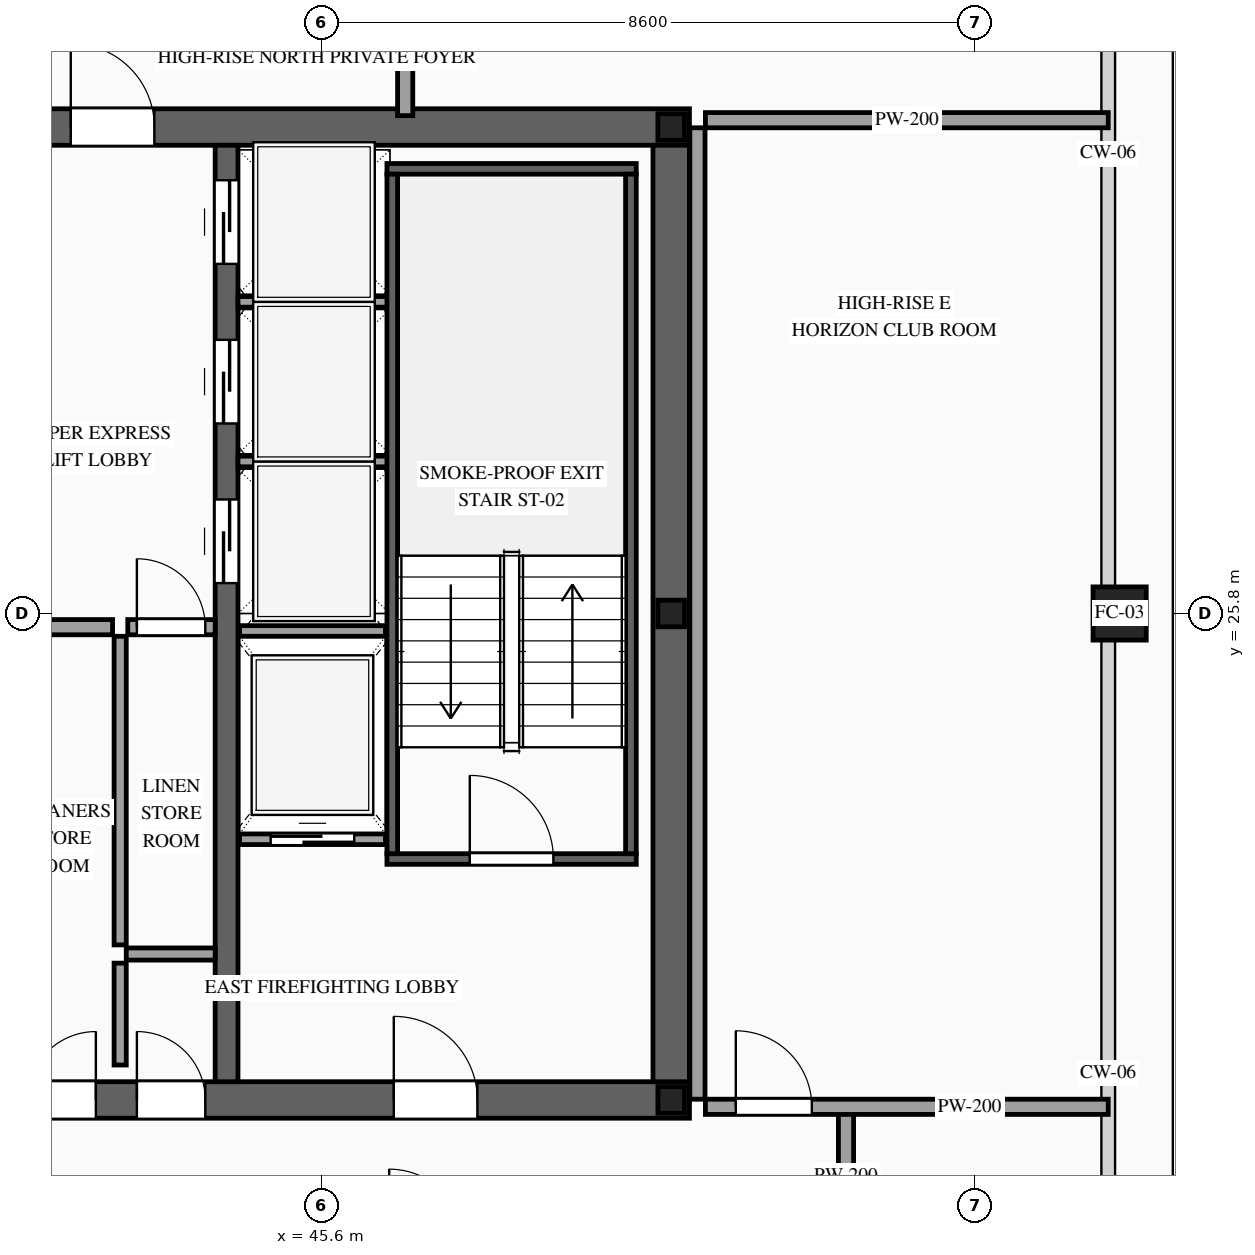
"""IFC4 building model, lengths in metres.
Left out: names, types, materials, properties, quantities, classifications, styles, units other than length and angle.
Written with IfcOpenShell. Run it as: python <this file> out.ifc"""

import sys

from ifc_helpers import new_model, si_unit, direction, frame, frame_2d, origin, origin_2d, place, context, subcontext, project, spatial, rectangle, hollow_rectangle, i_section, extrude, source, transform, mapped, element, fill, save


model = new_model("IFC4")
c1 = context("Model", 3, precision=1e-05, world=origin(), true_north=direction((0.0, 1.0)))
c2 = subcontext(c1, "Body", "Model", "MODEL_VIEW")
j1 = project(units=[si_unit("LENGTHUNIT", "METRE"), si_unit("PLANEANGLEUNIT", "RADIAN")], contexts=[c1])
p1 = place(None, origin())
s1 = spatial("IfcSite", under=j1, at=p1, CompositionType="ELEMENT")
p2 = place(p1, origin())
s2 = spatial("IfcBuilding", under=s1, at=p2, CompositionType="ELEMENT")
p3 = place(p2, frame((0.0, 0.0, 314.7)))
s3 = spatial("IfcBuildingStorey", under=s2, at=p3, CompositionType="ELEMENT", Elevation=314.7)
p4 = place(p3, frame((23.56, 19.4, 0.0), z_axis=(0.0, 0.0, 1.0), x_axis=(1.0, 0.0, 0.0)))
e1 = element("IfcWall", 1, at=p4, inside=s3, PredefinedType="SHEAR", context=c2, shape_type="SweptSolid", body=[
    extrude(rectangle(XDim=26.88, YDim=0.48, at=frame_2d((13.44, 0.0))), origin(), (0.0, 0.0, 1.0), 3.5),
])
p5 = place(p4, frame((1.89, 0.0, 0.0)))
e2 = element("IfcOpeningElement", 2, at=p5, cuts=e1, PredefinedType="OPENING", context=c2, shape_type="SweptSolid", body=[
    extrude(rectangle(XDim=1.1, YDim=2.2, at=frame_2d((0.55, 1.1))), frame((0.0, 0.255, 0.0), z_axis=(0.0, -1.0, 0.0), x_axis=(1.0, 0.0, 0.0)), (0.0, 0.0, 1.0), 0.51),
])
p6 = place(p4, frame((9.79, 0.0, 0.0)))
e3 = element("IfcOpeningElement", 3, at=p6, cuts=e1, PredefinedType="OPENING", context=c2, shape_type="SweptSolid", body=[
    extrude(rectangle(XDim=1.1, YDim=2.2, at=frame_2d((0.55, 1.1))), frame((0.0, 0.255, 0.0), z_axis=(0.0, -1.0, 0.0), x_axis=(1.0, 0.0, 0.0)), (0.0, 0.0, 1.0), 0.51),
])
p7 = place(p4, frame((22.99, 0.0, 0.0)))
e4 = element("IfcOpeningElement", 4, at=p7, cuts=e1, PredefinedType="OPENING", context=c2, shape_type="SweptSolid", body=[
    extrude(rectangle(XDim=1.1, YDim=2.2, at=frame_2d((0.55, 1.1))), frame((0.0, 0.255, 0.0), z_axis=(0.0, -1.0, 0.0), x_axis=(1.0, 0.0, 0.0)), (0.0, 0.0, 1.0), 0.51),
])
p8 = place(p4, frame((19.61, 0.0, 0.0)))
e5 = element("IfcOpeningElement", 5, at=p8, cuts=e1, PredefinedType="OPENING", context=c2, shape_type="SweptSolid", body=[
    extrude(rectangle(XDim=0.9, YDim=2.15, at=frame_2d((0.45, 1.075))), frame((0.0, 0.255, 0.0), z_axis=(0.0, -1.0, 0.0), x_axis=(1.0, 0.0, 0.0)), (0.0, 0.0, 1.0), 0.51),
])
p9 = place(p4, frame((18.17, 0.0, 0.0)))
e6 = element("IfcOpeningElement", 6, at=p9, cuts=e1, PredefinedType="OPENING", context=c2, shape_type="SweptSolid", body=[
    extrude(rectangle(XDim=0.9, YDim=2.15, at=frame_2d((0.45, 1.075))), frame((0.0, 0.255, 0.0), z_axis=(0.0, -1.0, 0.0), x_axis=(1.0, 0.0, 0.0)), (0.0, 0.0, 1.0), 0.51),
])
p10 = place(p3, frame((23.56, 32.2, 0.0), z_axis=(0.0, 0.0, 1.0), x_axis=(1.0, 0.0, 0.0)))
e7 = element("IfcWall", 7, at=p10, inside=s3, PredefinedType="SHEAR", context=c2, shape_type="SweptSolid", body=[
    extrude(rectangle(XDim=26.88, YDim=0.48, at=frame_2d((13.44, 0.0))), origin(), (0.0, 0.0, 1.0), 3.5),
])
p11 = place(p10, frame((4.51, 0.0, 0.0)))
e8 = element("IfcOpeningElement", 8, at=p11, cuts=e7, PredefinedType="OPENING", context=c2, shape_type="SweptSolid", body=[
    extrude(rectangle(XDim=0.9, YDim=2.15, at=frame_2d((0.45, 1.075))), frame((0.0, 0.255, 0.0), z_axis=(0.0, -1.0, 0.0), x_axis=(1.0, 0.0, 0.0)), (0.0, 0.0, 1.0), 0.51),
])
p12 = place(p10, frame((9.79, 0.0, 0.0)))
e9 = element("IfcOpeningElement", 9, at=p12, cuts=e7, PredefinedType="OPENING", context=c2, shape_type="SweptSolid", body=[
    extrude(rectangle(XDim=1.1, YDim=2.2, at=frame_2d((0.55, 1.1))), frame((0.0, 0.255, 0.0), z_axis=(0.0, -1.0, 0.0), x_axis=(1.0, 0.0, 0.0)), (0.0, 0.0, 1.0), 0.51),
])
p13 = place(p10, frame((15.64, 0.0, 0.0)))
e10 = element("IfcOpeningElement", 10, at=p13, cuts=e7, PredefinedType="OPENING", context=c2, shape_type="SweptSolid", body=[
    extrude(rectangle(XDim=1.1, YDim=2.2, at=frame_2d((0.55, 1.1))), frame((0.0, 0.255, 0.0), z_axis=(0.0, -1.0, 0.0), x_axis=(1.0, 0.0, 0.0)), (0.0, 0.0, 1.0), 0.51),
])
p14 = place(p10, frame((18.74, 0.0, 0.0)))
e11 = element("IfcOpeningElement", 11, at=p14, cuts=e7, PredefinedType="OPENING", context=c2, shape_type="SweptSolid", body=[
    extrude(rectangle(XDim=1.1, YDim=2.2, at=frame_2d((0.55, 1.1))), frame((0.0, 0.255, 0.0), z_axis=(0.0, -1.0, 0.0), x_axis=(1.0, 0.0, 0.0)), (0.0, 0.0, 1.0), 0.51),
])
m1 = source(origin(), c2, "Body", "SweptSolid", [
    extrude(rectangle(XDim=12.32, YDim=0.48, at=frame_2d((6.16, 0.0))), origin(), (0.0, 0.0, 1.0), 3.5),
])
p15 = place(p3, frame((50.2, 19.64, 0.0), z_axis=(0.0, 0.0, 1.0), x_axis=(0.0, 1.0, 0.0)))
e12 = element("IfcWall", 12, at=p15, inside=s3, PredefinedType="SHEAR", context=c2, shape_type="MappedRepresentation", body=[
    mapped(m1, transform((0.0, 0.0, 0.0), scale=1.0)),
])
p16 = place(p3, frame((44.35, 19.64, 0.0), z_axis=(0.0, 0.0, 1.0), x_axis=(0.0, 1.0, 0.0)))
e13 = element("IfcWall", 13, at=p16, inside=s3, PredefinedType="SOLIDWALL", context=c2, shape_type="SweptSolid", body=[
    extrude(rectangle(XDim=12.32, YDim=0.3, at=frame_2d((6.16, 0.0))), origin(), (0.0, 0.0, 1.0), 3.5),
])
p17 = place(p16, frame((6.56, 0.0, 0.0)))
e14 = element("IfcOpeningElement", 14, at=p17, cuts=e13, PredefinedType="OPENING", context=c2, shape_type="SweptSolid", body=[
    extrude(rectangle(XDim=1.1, YDim=2.2, at=frame_2d((0.55, 1.1))), frame((0.0, 0.165, 0.0), z_axis=(0.0, -1.0, 0.0), x_axis=(1.0, 0.0, 0.0)), (0.0, 0.0, 1.0), 0.33),
])
p18 = place(p16, frame((8.66, 0.0, 0.0)))
e15 = element("IfcOpeningElement", 15, at=p18, cuts=e13, PredefinedType="OPENING", context=c2, shape_type="SweptSolid", body=[
    extrude(rectangle(XDim=1.1, YDim=2.2, at=frame_2d((0.55, 1.1))), frame((0.0, 0.165, 0.0), z_axis=(0.0, -1.0, 0.0), x_axis=(1.0, 0.0, 0.0)), (0.0, 0.0, 1.0), 0.33),
])
p19 = place(p16, frame((10.76, 0.0, 0.0)))
e16 = element("IfcOpeningElement", 16, at=p19, cuts=e13, PredefinedType="OPENING", context=c2, shape_type="SweptSolid", body=[
    extrude(rectangle(XDim=1.1, YDim=2.2, at=frame_2d((0.55, 1.1))), frame((0.0, 0.165, 0.0), z_axis=(0.0, -1.0, 0.0), x_axis=(1.0, 0.0, 0.0)), (0.0, 0.0, 1.0), 0.33),
])
m2 = source(origin(), c2, "Body", "SweptSolid", [
    extrude(i_section(OverallWidth=0.35, OverallDepth=0.35, WebThickness=0.012, FlangeThickness=0.019, at=origin_2d()), origin(), (0.0, 0.0, 1.0), 3.5),
])
for number, where, z_axis, x_axis in (
    (17, (50.2, 19.4, 0.0), (0.0, 0.0, 1.0), (1.0, 0.0, 0.0)),
    (18, (50.2, 25.8, 0.0), (0.0, 0.0, 1.0), (1.0, 0.0, 0.0)),
    (19, (50.2, 32.2, 0.0), (0.0, 0.0, 1.0), (1.0, 0.0, 0.0)),
):
    element("IfcColumn", number, at=place(p3, frame(where, z_axis=z_axis, x_axis=x_axis)), inside=s3, PredefinedType="COLUMN", context=c2, shape_type="MappedRepresentation", body=[
        mapped(m2, transform((0.0, 0.0, 0.0), scale=1.0)),
    ])
m3 = source(origin(), c2, "Body", "SweptSolid", [
    extrude(hollow_rectangle(XDim=0.7, YDim=0.7, WallThickness=0.032, at=origin_2d()), origin(), (0.0, 0.0, 1.0), 3.5),
])
p20 = place(p3, frame((56.1, 25.8, 0.0), z_axis=(0.0, 0.0, 1.0), x_axis=(1.0, 0.0, 0.0)))
e20 = element("IfcColumn", 20, at=p20, inside=s3, PredefinedType="COLUMN", context=c2, shape_type="MappedRepresentation", body=[
    mapped(m3, transform((0.0, 0.0, 0.0), scale=1.0)),
])
p21 = place(p3, frame((44.52, 22.83, 0.0), z_axis=(0.0, 0.0, 1.0), x_axis=(1.0, 0.0, 0.0)))
e21 = element("IfcWall", 21, at=p21, inside=s3, PredefinedType="SOLIDWALL", context=c2, shape_type="SweptSolid", body=[
    extrude(rectangle(XDim=1.92, YDim=0.14, at=frame_2d((0.96, 0.0))), origin(), (0.0, 0.0, 1.0), 3.28),
])
p22 = place(p21, frame((0.41, 0.0, 0.0)))
e22 = element("IfcOpeningElement", 22, at=p22, cuts=e21, PredefinedType="OPENING", context=c2, shape_type="SweptSolid", body=[
    extrude(rectangle(XDim=1.1, YDim=2.2, at=frame_2d((0.55, 1.1))), frame((0.0, 0.085, 0.0), z_axis=(0.0, -1.0, 0.0), x_axis=(1.0, 0.0, 0.0)), (0.0, 0.0, 1.0), 0.17),
])
m4 = source(origin(), c2, "Body", "SweptSolid", [
    extrude(rectangle(XDim=1.92, YDim=0.14, at=frame_2d((0.96, 0.0))), origin(), (0.0, 0.0, 1.0), 3.28),
])
p23 = place(p3, frame((44.52, 25.57, 0.0), z_axis=(0.0, 0.0, 1.0), x_axis=(1.0, 0.0, 0.0)))
e23 = element("IfcWall", 23, at=p23, inside=s3, PredefinedType="SOLIDWALL", context=c2, shape_type="MappedRepresentation", body=[
    mapped(m4, transform((0.0, 0.0, 0.0), scale=1.0)),
])
m5 = source(origin(), c2, "Body", "SweptSolid", [
    extrude(rectangle(XDim=2.0, YDim=0.14, at=frame_2d((1.0, 0.0))), origin(), (0.0, 0.0, 1.0), 3.28),
])
for number, where, z_axis, x_axis in (
    (24, (44.5, 27.8, 0.0), (0.0, 0.0, 1.0), (1.0, 0.0, 0.0)),
    (25, (44.5, 29.9, 0.0), (0.0, 0.0, 1.0), (1.0, 0.0, 0.0)),
):
    element("IfcWall", number, at=place(p3, frame(where, z_axis=z_axis, x_axis=x_axis)), inside=s3, PredefinedType="SOLIDWALL", context=c2, shape_type="MappedRepresentation", body=[
        mapped(m5, transform((0.0, 0.0, 0.0), scale=1.0)),
    ])
p24 = place(p3, frame((46.46, 22.57, 0.0), z_axis=(0.0, 0.0, 1.0), x_axis=(1.0, 0.0, 0.0)))
e26 = element("IfcWall", 26, at=p24, inside=s3, PredefinedType="SOLIDWALL", context=c2, shape_type="SweptSolid", body=[
    extrude(rectangle(XDim=3.28, YDim=0.14, at=frame_2d((1.64, 0.0))), origin(), (0.0, 0.0, 1.0), 3.28),
])
p25 = place(p24, frame((1.09, 0.0, 0.0)))
e27 = element("IfcOpeningElement", 27, at=p25, cuts=e26, PredefinedType="OPENING", context=c2, shape_type="SweptSolid", body=[
    extrude(rectangle(XDim=1.1, YDim=2.2, at=frame_2d((0.55, 1.1))), frame((0.0, 0.085, 0.0), z_axis=(0.0, -1.0, 0.0), x_axis=(1.0, 0.0, 0.0)), (0.0, 0.0, 1.0), 0.17),
])
m6 = source(origin(), c2, "Body", "SweptSolid", [
    extrude(rectangle(XDim=3.28, YDim=0.14, at=frame_2d((1.64, 0.0))), origin(), (0.0, 0.0, 1.0), 3.28),
])
p26 = place(p3, frame((46.46, 31.65, 0.0), z_axis=(0.0, 0.0, 1.0), x_axis=(1.0, 0.0, 0.0)))
e28 = element("IfcWall", 28, at=p26, inside=s3, PredefinedType="SOLIDWALL", context=c2, shape_type="MappedRepresentation", body=[
    mapped(m6, transform((0.0, 0.0, 0.0), scale=1.0)),
])
m7 = source(origin(), c2, "Body", "SweptSolid", [
    extrude(rectangle(XDim=8.94, YDim=0.14, at=frame_2d((4.47, 0.0))), origin(), (0.0, 0.0, 1.0), 3.28),
])
for number, where, z_axis, x_axis in (
    (29, (46.53, 22.64, 0.0), (0.0, 0.0, 1.0), (0.0, 1.0, 0.0)),
    (30, (49.67, 22.64, 0.0), (0.0, 0.0, 1.0), (0.0, 1.0, 0.0)),
):
    element("IfcWall", number, at=place(p3, frame(where, z_axis=z_axis, x_axis=x_axis)), inside=s3, PredefinedType="SOLIDWALL", context=c2, shape_type="MappedRepresentation", body=[
        mapped(m7, transform((0.0, 0.0, 0.0), scale=1.0)),
    ])
m8 = source(origin(), c2, "Body", "SweptSolid", [
    extrude(rectangle(XDim=1.34, YDim=0.16, at=frame_2d((0.67, 0.0))), origin(), (0.0, 0.0, 1.0), 3.28),
])
p27 = place(p3, frame((42.95, 19.86, 0.0), z_axis=(0.0, 0.0, 1.0), x_axis=(0.0, 1.0, 0.0)))
e31 = element("IfcWall", 31, at=p27, inside=s3, PredefinedType="PARTITIONING", context=c2, shape_type="MappedRepresentation", body=[
    mapped(m8, transform((0.0, 0.0, 0.0), scale=1.0)),
])
m9 = source(origin(), c2, "Body", "SweptSolid", [
    extrude(rectangle(XDim=1.17, YDim=0.16, at=frame_2d((0.585, 0.0))), origin(), (0.0, 0.0, 1.0), 3.28),
])
p28 = place(p3, frame((43.03, 21.32, 0.0), z_axis=(0.0, 0.0, 1.0), x_axis=(1.0, 0.0, 0.0)))
e32 = element("IfcWall", 32, at=p28, inside=s3, PredefinedType="PARTITIONING", context=c2, shape_type="MappedRepresentation", body=[
    mapped(m9, transform((0.0, 0.0, 0.0), scale=1.0)),
])
m10 = source(origin(), c2, "Body", "SweptSolid", [
    extrude(rectangle(XDim=1.35, YDim=0.2, at=frame_2d((0.675, 0.0))), origin(), (0.0, 0.0, 1.0), 3.28),
])
p29 = place(p3, frame((41.5, 25.62, 0.0), z_axis=(0.0, 0.0, 1.0), x_axis=(1.0, 0.0, 0.0)))
e33 = element("IfcWall", 33, at=p29, inside=s3, PredefinedType="PARTITIONING", context=c2, shape_type="MappedRepresentation", body=[
    mapped(m10, transform((0.0, 0.0, 0.0), scale=1.0)),
])
m11 = source(origin(), c2, "Body", "SweptSolid", [
    extrude(rectangle(XDim=4.06, YDim=0.16, at=frame_2d((2.03, 0.0))), origin(), (0.0, 0.0, 1.0), 3.28),
])
p30 = place(p3, frame((42.95, 21.44, 0.0), z_axis=(0.0, 0.0, 1.0), x_axis=(0.0, 1.0, 0.0)))
e34 = element("IfcWall", 34, at=p30, inside=s3, PredefinedType="PARTITIONING", context=c2, shape_type="MappedRepresentation", body=[
    mapped(m11, transform((0.0, 0.0, 0.0), scale=1.0)),
])
p31 = place(p3, frame((43.05, 25.62, 0.0), z_axis=(0.0, 0.0, 1.0), x_axis=(1.0, 0.0, 0.0)))
e35 = element("IfcWall", 35, at=p31, inside=s3, PredefinedType="PARTITIONING", context=c2, shape_type="SweptSolid", body=[
    extrude(rectangle(XDim=1.15, YDim=0.2, at=frame_2d((0.575, 0.0))), origin(), (0.0, 0.0, 1.0), 3.28),
])
p32 = place(p31, frame((0.12, 0.0, 0.0)))
e36 = element("IfcOpeningElement", 36, at=p32, cuts=e35, PredefinedType="OPENING", context=c2, shape_type="SweptSolid", body=[
    extrude(rectangle(XDim=0.9, YDim=2.15, at=frame_2d((0.45, 1.075))), frame((0.0, 0.115, 0.0), z_axis=(0.0, -1.0, 0.0), x_axis=(1.0, 0.0, 0.0)), (0.0, 0.0, 1.0), 0.23),
])
m12 = source(origin(), c2, "Body", "SweptSolid", [
    extrude(rectangle(XDim=1.7, YDim=0.2, at=frame_2d((0.85, 0.0))), origin(), (0.0, 0.0, 1.0), 3.28),
])
for number, where, z_axis, x_axis in (
    (37, (46.7, 32.35, 0.0), (0.0, 0.0, 1.0), (0.0, 1.0, 0.0)),
    (38, (52.5, 17.55, 0.0), (0.0, 0.0, 1.0), (0.0, 1.0, 0.0)),
):
    element("IfcWall", number, at=place(p3, frame(where, z_axis=z_axis, x_axis=x_axis)), inside=s3, PredefinedType="PARTITIONING", context=c2, shape_type="MappedRepresentation", body=[
        mapped(m12, transform((0.0, 0.0, 0.0), scale=1.0)),
    ])
p33 = place(p3, frame((50.65, 19.31, 0.0), z_axis=(0.0, 0.0, 1.0), x_axis=(1.0, 0.0, 0.0)))
e39 = element("IfcWall", 39, at=p33, inside=s3, PredefinedType="PARTITIONING", context=c2, shape_type="SweptSolid", body=[
    extrude(rectangle(XDim=5.3, YDim=0.2, at=frame_2d((2.65, 0.0))), origin(), (0.0, 0.0, 1.0), 2.825),
])
p34 = place(p33, frame((0.4, 0.0, 0.0)))
e40 = element("IfcOpeningElement", 40, at=p34, cuts=e39, PredefinedType="OPENING", context=c2, shape_type="SweptSolid", body=[
    extrude(rectangle(XDim=1.0, YDim=2.2, at=frame_2d((0.5, 1.1))), frame((0.0, 0.115, 0.0), z_axis=(0.0, -1.0, 0.0), x_axis=(1.0, 0.0, 0.0)), (0.0, 0.0, 1.0), 0.23),
])
m13 = source(origin(), c2, "Body", "SweptSolid", [
    extrude(rectangle(XDim=5.3, YDim=0.2, at=frame_2d((2.65, 0.0))), origin(), (0.0, 0.0, 1.0), 2.825),
])
p35 = place(p3, frame((50.65, 32.29, 0.0), z_axis=(0.0, 0.0, 1.0), x_axis=(1.0, 0.0, 0.0)))
e41 = element("IfcWall", 41, at=p35, inside=s3, PredefinedType="PARTITIONING", context=c2, shape_type="MappedRepresentation", body=[
    mapped(m13, transform((0.0, 0.0, 0.0), scale=1.0)),
])
m14 = source(origin(), c2, "Body", "SweptSolid", [
    extrude(rectangle(XDim=12.78, YDim=0.2, at=frame_2d((6.39, 0.0))), origin(), (0.0, 0.0, 1.0), 3.28),
])
p36 = place(p3, frame((50.545, 19.41, 0.0), z_axis=(0.0, 0.0, 1.0), x_axis=(0.0, 1.0, 0.0)))
e42 = element("IfcWall", 42, at=p36, inside=s3, PredefinedType="PARTITIONING", context=c2, shape_type="MappedRepresentation", body=[
    mapped(m14, transform((0.0, 0.0, 0.0), scale=1.0)),
])
m15 = source(origin(), c2, "Body", "SweptSolid", [
    extrude(rectangle(XDim=1.1, YDim=2.2, at=frame_2d((0.55, 1.1))), frame((0.0, 0.025, 0.0), z_axis=(0.0, -1.0, 0.0), x_axis=(1.0, 0.0, 0.0)), (0.0, 0.0, 1.0), 0.05),
])
p37 = place(p22, origin())
e43 = element("IfcDoor", 43, at=p37, inside=s3, OperationType="SLIDING_TO_RIGHT", PredefinedType="DOOR", context=c2, shape_type="MappedRepresentation", body=[
    mapped(m15, transform((0.0, 0.0, 0.0), scale=1.0)),
])
fill(e22, e43)
p38 = place(p17, origin())
e44 = element("IfcDoor", 44, at=p38, inside=s3, OperationType="SLIDING_TO_LEFT", PredefinedType="DOOR", context=c2, shape_type="MappedRepresentation", body=[
    mapped(m15, transform((0.0, 0.0, 0.0), scale=1.0)),
])
fill(e14, e44)
p39 = place(p18, origin())
e45 = element("IfcDoor", 45, at=p39, inside=s3, OperationType="SLIDING_TO_RIGHT", PredefinedType="DOOR", context=c2, shape_type="MappedRepresentation", body=[
    mapped(m15, transform((0.0, 0.0, 0.0), scale=1.0)),
])
fill(e15, e45)
p40 = place(p19, origin())
e46 = element("IfcDoor", 46, at=p40, inside=s3, OperationType="SLIDING_TO_LEFT", PredefinedType="DOOR", context=c2, shape_type="MappedRepresentation", body=[
    mapped(m15, transform((0.0, 0.0, 0.0), scale=1.0)),
])
fill(e16, e46)
m16 = source(origin(), c2, "Body", "SweptSolid", [
    extrude(rectangle(XDim=1.1, YDim=2.2, at=frame_2d((0.55, 1.1))), frame((0.0, 0.025, 0.0), z_axis=(0.0, -1.0, 0.0), x_axis=(1.0, 0.0, 0.0)), (0.0, 0.0, 1.0), 0.05),
])
p41 = place(p25, origin())
e47 = element("IfcDoor", 47, at=p41, inside=s3, OperationType="SINGLE_SWING_LEFT", PredefinedType="DOOR", context=c2, shape_type="MappedRepresentation", body=[
    mapped(m16, transform((0.0, 0.0, 0.0), scale=1.0)),
])
fill(e27, e47)
p42 = place(p7, origin())
e48 = element("IfcDoor", 48, at=p42, inside=s3, OperationType="SINGLE_SWING_LEFT", PredefinedType="DOOR", context=c2, shape_type="MappedRepresentation", body=[
    mapped(m16, transform((0.0, 0.0, 0.0), scale=1.0)),
])
fill(e4, e48)
p43 = place(p14, origin())
e49 = element("IfcDoor", 49, at=p43, inside=s3, OperationType="SINGLE_SWING_LEFT", PredefinedType="DOOR", context=c2, shape_type="MappedRepresentation", body=[
    mapped(m16, transform((0.0, 0.0, 0.0), scale=1.0)),
])
fill(e11, e49)
m17 = source(origin(), c2, "Body", "SweptSolid", [
    extrude(rectangle(XDim=0.9, YDim=2.15, at=frame_2d((0.45, 1.075))), frame((0.0, 0.025, 0.0), z_axis=(0.0, -1.0, 0.0), x_axis=(1.0, 0.0, 0.0)), (0.0, 0.0, 1.0), 0.05),
])
p44 = place(p8, origin())
e50 = element("IfcDoor", 50, at=p44, inside=s3, OperationType="SINGLE_SWING_LEFT", PredefinedType="DOOR", context=c2, shape_type="MappedRepresentation", body=[
    mapped(m17, transform((0.0, 0.0, 0.0), scale=1.0)),
])
fill(e5, e50)
p45 = place(p9, origin())
e51 = element("IfcDoor", 51, at=p45, inside=s3, OperationType="SINGLE_SWING_RIGHT", PredefinedType="DOOR", context=c2, shape_type="MappedRepresentation", body=[
    mapped(m17, transform((0.0, 0.0, 0.0), scale=1.0)),
])
fill(e6, e51)
p46 = place(p32, origin())
e52 = element("IfcDoor", 52, at=p46, inside=s3, OperationType="SINGLE_SWING_LEFT", PredefinedType="DOOR", context=c2, shape_type="MappedRepresentation", body=[
    mapped(m17, transform((0.0, 0.0, 0.0), scale=1.0)),
])
fill(e36, e52)
m18 = source(origin(), c2, "Body", "SweptSolid", [
    extrude(rectangle(XDim=1.0, YDim=2.2, at=frame_2d((0.5, 1.1))), frame((0.0, 0.025, 0.0), z_axis=(0.0, -1.0, 0.0), x_axis=(1.0, 0.0, 0.0)), (0.0, 0.0, 1.0), 0.05),
])
p47 = place(p34, origin())
e53 = element("IfcDoor", 53, at=p47, inside=s3, OperationType="SINGLE_SWING_LEFT", PredefinedType="DOOR", context=c2, shape_type="MappedRepresentation", body=[
    mapped(m18, transform((0.0, 0.0, 0.0), scale=1.0)),
])
fill(e40, e53)
save(model, sys.argv[1])
